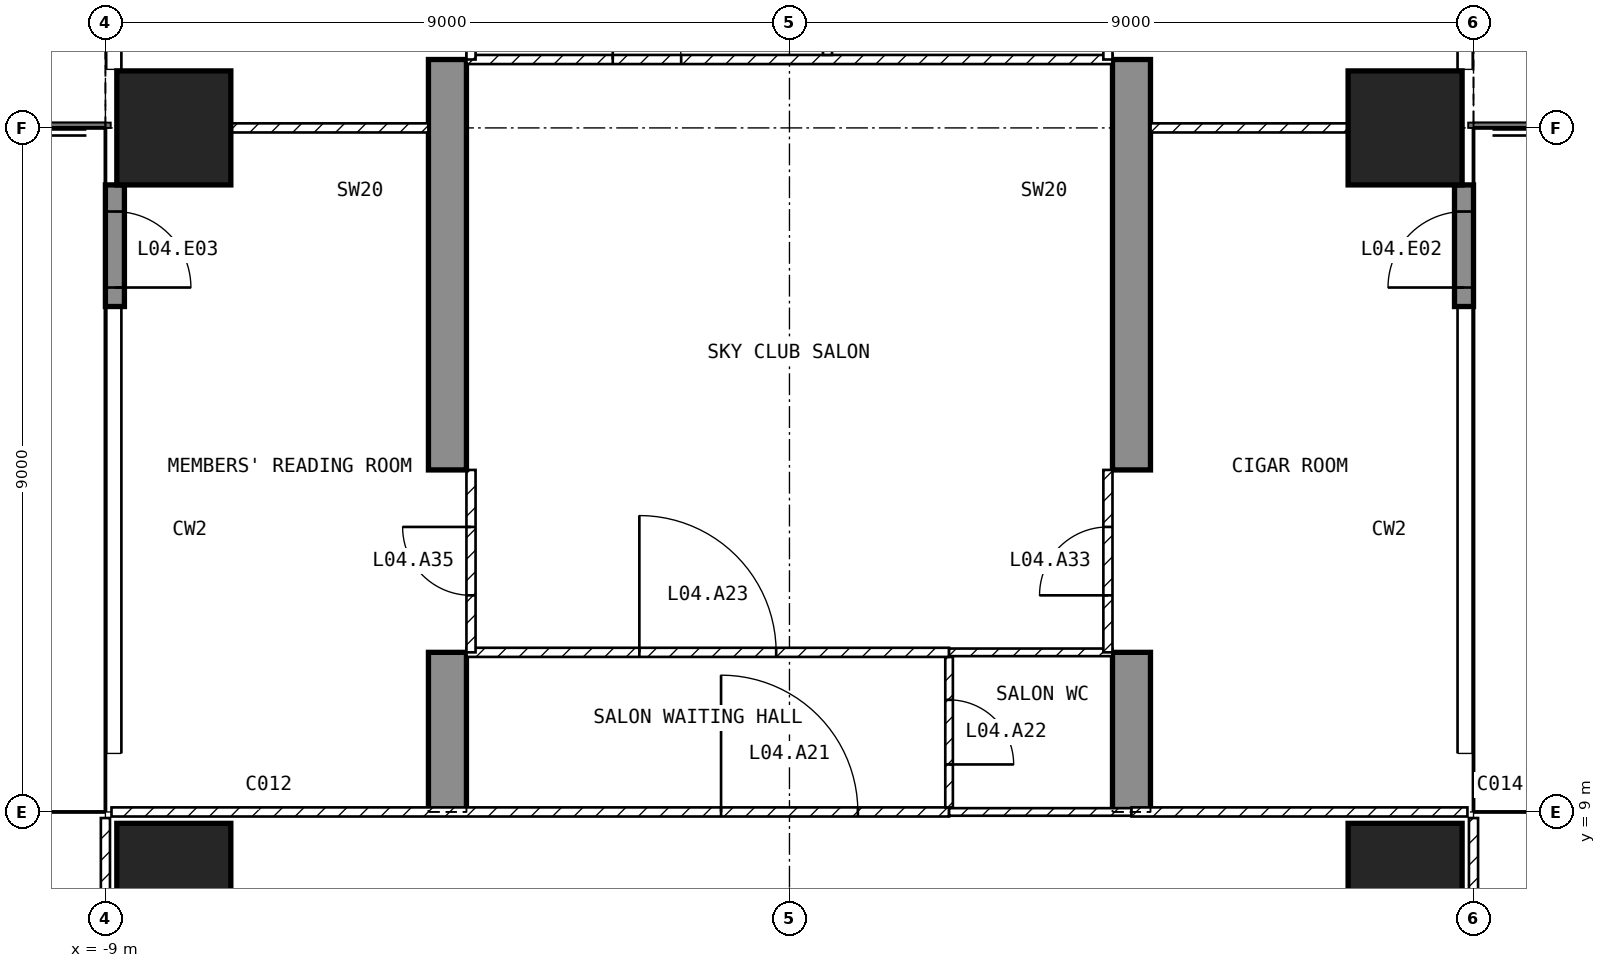
"""IFC4 building model, lengths in metres.
Left out: names, types, materials, properties, quantities, classifications, styles, units other than length and angle.
Written with IfcOpenShell. Run it as: python <this file> out.ifc"""

import sys

from ifc_helpers import new_model, si_unit, direction, frame, frame_2d, origin, origin_2d, place, context, subcontext, project, spatial, polyline, rectangle, outline, extrude, element, fill, save


model = new_model("IFC4")
c1 = context("Model", 3, precision=1e-05, world=origin(), true_north=direction((0.0, 1.0)))
c2 = subcontext(c1, "Body", "Model", "MODEL_VIEW")
j1 = project(units=[si_unit("LENGTHUNIT", "METRE"), si_unit("PLANEANGLEUNIT", "RADIAN")], contexts=[c1])
p1 = place(None, origin())
s1 = spatial("IfcSite", under=j1, at=p1, CompositionType="ELEMENT")
p2 = place(p1, origin())
s2 = spatial("IfcBuilding", under=s1, at=p2, CompositionType="ELEMENT")
p3 = place(p2, frame((0.0, 0.0, 32.0)))
s3 = spatial("IfcBuildingStorey", under=s2, at=p3, CompositionType="ELEMENT", Elevation=32.0)
for number, where, z_axis, x_axis in (
    (1, (-8.1, 8.1, -0.3), (0.0, 0.0, 1.0), (1.0, 0.0, 0.0)),
    (2, (-8.1, 18.0, -0.3), (0.0, 0.0, 1.0), (1.0, 0.0, 0.0)),
    (3, (8.1, 8.1, -0.3), (0.0, 0.0, 1.0), (1.0, 0.0, 0.0)),
    (4, (8.1, 18.0, -0.3), (0.0, 0.0, 1.0), (1.0, 0.0, 0.0)),
):
    element("IfcColumn", number, at=place(p3, frame(where, z_axis=z_axis, x_axis=x_axis)), inside=s3, PredefinedType="COLUMN", context=c2, shape_type="SweptSolid", body=[
        extrude(rectangle(XDim=1.5, YDim=1.5, at=origin_2d()), origin(), (0.0, 0.0, 1.0), 4.55),
    ])
for number, where, z_axis, x_axis in (
    (5, (-4.75, 9.0, -0.3), (1.0, 0.0, 0.0), (0.0, 1.0, 0.0)),
    (6, (4.25, 9.0, -0.3), (1.0, 0.0, 0.0), (0.0, 1.0, 0.0)),
):
    element("IfcWall", number, at=place(p3, frame(where, z_axis=z_axis, x_axis=x_axis)), inside=s3, PredefinedType="SHEAR", context=c2, shape_type="SweptSolid", body=[
        extrude(outline(polyline([(0.0, 0.0), (2.1, 0.0), (2.1, 2.7), (4.5, 2.7), (4.5, 0.0), (9.9, 0.0), (9.9, 2.7), (12.3, 2.7), (12.3, 0.0), (16.35, 0.0), (16.35, 4.55), (0.0, 4.55), (0.0, 0.0)])), origin(), (0.0, 0.0, 1.0), 0.5),
    ])
p4 = place(p3, frame((8.875, 15.65, 0.0), z_axis=(0.0, 0.0, 1.0), x_axis=(0.0, 1.0, 0.0)))
e7 = element("IfcWall", 7, at=p4, inside=s3, PredefinedType="SOLIDWALL", context=c2, shape_type="SweptSolid", body=[
    extrude(rectangle(XDim=1.6, YDim=0.25, at=frame_2d((0.8, 0.0))), origin(), (0.0, 0.0, 1.0), 4.25),
])
p5 = place(p4, frame((0.25, 0.0, 0.0)))
e8 = element("IfcOpeningElement", 8, at=p5, cuts=e7, PredefinedType="OPENING", context=c2, shape_type="SweptSolid", body=[
    extrude(rectangle(XDim=1.0, YDim=2.4, at=frame_2d((0.5, 1.2))), frame((0.0, 0.135, 0.0), z_axis=(0.0, -1.0, 0.0), x_axis=(1.0, 0.0, 0.0)), (0.0, 0.0, 1.0), 0.27),
])
p6 = place(p3, frame((-8.875, 17.25, 0.0), z_axis=(0.0, 0.0, 1.0), x_axis=(0.0, -1.0, 0.0)))
e9 = element("IfcWall", 9, at=p6, inside=s3, PredefinedType="SOLIDWALL", context=c2, shape_type="SweptSolid", body=[
    extrude(rectangle(XDim=1.6, YDim=0.25, at=frame_2d((0.8, 0.0))), origin(), (0.0, 0.0, 1.0), 4.25),
])
p7 = place(p6, frame((0.35, 0.0, 0.0)))
e10 = element("IfcOpeningElement", 10, at=p7, cuts=e9, PredefinedType="OPENING", context=c2, shape_type="SweptSolid", body=[
    extrude(rectangle(XDim=1.0, YDim=2.4, at=frame_2d((0.5, 1.2))), frame((0.0, 0.135, 0.0), z_axis=(0.0, -1.0, 0.0), x_axis=(1.0, 0.0, 0.0)), (0.0, 0.0, 1.0), 0.27),
])
p8 = place(p3, frame((9.0, 8.92, 0.0), z_axis=(0.0, 0.0, 1.0), x_axis=(0.0, -1.0, 0.0)))
e11 = element("IfcWall", 11, at=p8, inside=s3, PredefinedType="PARTITIONING", context=c2, shape_type="SweptSolid", body=[
    extrude(rectangle(XDim=7.66, YDim=0.12, at=frame_2d((3.83, 0.0))), origin(), (0.0, 0.0, 1.0), 4.25),
])
p9 = place(p8, frame((2.77, 0.0, 0.0)))
e12 = element("IfcOpeningElement", 12, at=p9, cuts=e11, PredefinedType="OPENING", context=c2, shape_type="SweptSolid", body=[
    extrude(rectangle(XDim=0.9, YDim=2.1, at=frame_2d((0.45, 1.05))), frame((0.0, 0.07, 0.0), z_axis=(0.0, -1.0, 0.0), x_axis=(1.0, 0.0, 0.0)), (0.0, 0.0, 1.0), 0.14),
])
p10 = place(p8, frame((5.89, 0.0, 0.0)))
e13 = element("IfcOpeningElement", 13, at=p10, cuts=e11, PredefinedType="OPENING", context=c2, shape_type="SweptSolid", body=[
    extrude(rectangle(XDim=0.9, YDim=2.1, at=frame_2d((0.45, 1.05))), frame((0.0, 0.07, 0.0), z_axis=(0.0, -1.0, 0.0), x_axis=(1.0, 0.0, 0.0)), (0.0, 0.0, 1.0), 0.14),
])
p11 = place(p3, frame((-9.0, 1.26, 0.0), z_axis=(0.0, 0.0, 1.0), x_axis=(0.0, 1.0, 0.0)))
e14 = element("IfcWall", 14, at=p11, inside=s3, PredefinedType="PARTITIONING", context=c2, shape_type="SweptSolid", body=[
    extrude(rectangle(XDim=7.66, YDim=0.12, at=frame_2d((3.83, 0.0))), origin(), (0.0, 0.0, 1.0), 4.25),
])
p12 = place(p11, frame((0.72, 0.0, 0.0)))
e15 = element("IfcOpeningElement", 15, at=p12, cuts=e14, PredefinedType="OPENING", context=c2, shape_type="SweptSolid", body=[
    extrude(rectangle(XDim=0.9, YDim=2.1, at=frame_2d((0.45, 1.05))), frame((0.0, 0.07, 0.0), z_axis=(0.0, -1.0, 0.0), x_axis=(1.0, 0.0, 0.0)), (0.0, 0.0, 1.0), 0.14),
])
p13 = place(p3, frame((-8.92, 9.0, 0.0), z_axis=(0.0, 0.0, 1.0), x_axis=(1.0, 0.0, 0.0)))
e16 = element("IfcWall", 16, at=p13, inside=s3, PredefinedType="PARTITIONING", context=c2, shape_type="SweptSolid", body=[
    extrude(rectangle(XDim=11.02, YDim=0.12, at=frame_2d((5.51, 0.0))), origin(), (0.0, 0.0, 1.0), 4.25),
])
p14 = place(p13, frame((8.02, 0.0, 0.0)))
e17 = element("IfcOpeningElement", 17, at=p14, cuts=e16, PredefinedType="OPENING", context=c2, shape_type="SweptSolid", body=[
    extrude(rectangle(XDim=1.8, YDim=2.1, at=frame_2d((0.9, 1.05))), frame((0.0, 0.07, 0.0), z_axis=(0.0, -1.0, 0.0), x_axis=(1.0, 0.0, 0.0)), (0.0, 0.0, 1.0), 0.14),
])
p15 = place(p3, frame((2.1, 9.0, 0.0), z_axis=(0.0, 0.0, 1.0), x_axis=(1.0, 0.0, 0.0)))
e18 = element("IfcWall", 18, at=p15, inside=s3, PredefinedType="PARTITIONING", context=c2, shape_type="SweptSolid", body=[
    extrude(rectangle(XDim=2.4, YDim=0.1, at=frame_2d((1.2, 0.0))), origin(), (0.0, 0.0, 1.0), 4.25),
])
p16 = place(p3, frame((4.5, 9.0, 0.0), z_axis=(0.0, 0.0, 1.0), x_axis=(1.0, 0.0, 0.0)))
e19 = element("IfcWall", 19, at=p16, inside=s3, PredefinedType="PARTITIONING", context=c2, shape_type="SweptSolid", body=[
    extrude(rectangle(XDim=4.42, YDim=0.12, at=frame_2d((2.21, 0.0))), origin(), (0.0, 0.0, 1.0), 4.25),
])
p17 = place(p3, frame((2.1, 11.04, 0.0), z_axis=(0.0, 0.0, 1.0), x_axis=(0.0, -1.0, 0.0)))
e20 = element("IfcWall", 20, at=p17, inside=s3, PredefinedType="PARTITIONING", context=c2, shape_type="SweptSolid", body=[
    extrude(rectangle(XDim=1.98, YDim=0.1, at=frame_2d((0.99, 0.0))), origin(), (0.0, 0.0, 1.0), 4.25),
])
p18 = place(p17, frame((0.565, 0.0, 0.0)))
e21 = element("IfcOpeningElement", 21, at=p18, cuts=e20, PredefinedType="OPENING", context=c2, shape_type="SweptSolid", body=[
    extrude(rectangle(XDim=0.85, YDim=2.1, at=frame_2d((0.425, 1.05))), frame((0.0, 0.06, 0.0), z_axis=(0.0, -1.0, 0.0), x_axis=(1.0, 0.0, 0.0)), (0.0, 0.0, 1.0), 0.12),
])
p19 = place(p3, frame((-4.25, 11.1, 0.0), z_axis=(0.0, 0.0, 1.0), x_axis=(1.0, 0.0, 0.0)))
e22 = element("IfcWall", 22, at=p19, inside=s3, PredefinedType="PARTITIONING", context=c2, shape_type="SweptSolid", body=[
    extrude(rectangle(XDim=6.35, YDim=0.12, at=frame_2d((3.175, 0.0))), origin(), (0.0, 0.0, 1.0), 4.25),
])
p20 = place(p19, frame((2.275, 0.0, 0.0)))
e23 = element("IfcOpeningElement", 23, at=p20, cuts=e22, PredefinedType="OPENING", context=c2, shape_type="SweptSolid", body=[
    extrude(rectangle(XDim=1.8, YDim=2.1, at=frame_2d((0.9, 1.05))), frame((0.0, 0.07, 0.0), z_axis=(0.0, -1.0, 0.0), x_axis=(1.0, 0.0, 0.0)), (0.0, 0.0, 1.0), 0.14),
])
p21 = place(p3, frame((2.1, 11.1, 0.0), z_axis=(0.0, 0.0, 1.0), x_axis=(1.0, 0.0, 0.0)))
e24 = element("IfcWall", 24, at=p21, inside=s3, PredefinedType="PARTITIONING", context=c2, shape_type="SweptSolid", body=[
    extrude(rectangle(XDim=2.15, YDim=0.1, at=frame_2d((1.075, 0.0))), origin(), (0.0, 0.0, 1.0), 4.25),
])
p22 = place(p3, frame((-4.25, 18.9, 0.0), z_axis=(0.0, 0.0, 1.0), x_axis=(1.0, 0.0, 0.0)))
e25 = element("IfcWall", 25, at=p22, inside=s3, PredefinedType="PARTITIONING", context=c2, shape_type="SweptSolid", body=[
    extrude(rectangle(XDim=8.5, YDim=0.12, at=frame_2d((4.25, 0.0))), origin(), (0.0, 0.0, 1.0), 4.25),
])
p23 = place(p22, frame((1.925, 0.0, 0.0)))
e26 = element("IfcOpeningElement", 26, at=p23, cuts=e25, PredefinedType="OPENING", context=c2, shape_type="SweptSolid", body=[
    extrude(rectangle(XDim=0.9, YDim=2.1, at=frame_2d((0.45, 1.05))), frame((0.0, 0.07, 0.0), z_axis=(0.0, -1.0, 0.0), x_axis=(1.0, 0.0, 0.0)), (0.0, 0.0, 1.0), 0.14),
])
p24 = place(p3, frame((0.5, 23.34, 0.0), z_axis=(0.0, 0.0, 1.0), x_axis=(0.0, -1.0, 0.0)))
e27 = element("IfcWall", 27, at=p24, inside=s3, PredefinedType="PARTITIONING", context=c2, shape_type="SweptSolid", body=[
    extrude(rectangle(XDim=4.38, YDim=0.12, at=frame_2d((2.19, 0.0))), origin(), (0.0, 0.0, 1.0), 4.25),
])
p25 = place(p24, frame((1.74, 0.0, 0.0)))
e28 = element("IfcOpeningElement", 28, at=p25, cuts=e27, PredefinedType="OPENING", context=c2, shape_type="SweptSolid", body=[
    extrude(rectangle(XDim=0.9, YDim=2.1, at=frame_2d((0.45, 1.05))), frame((0.0, 0.07, 0.0), z_axis=(0.0, -1.0, 0.0), x_axis=(1.0, 0.0, 0.0)), (0.0, 0.0, 1.0), 0.14),
])
for number, where, z_axis, x_axis in (
    (29, (4.75, 18.0, 0.0), (0.0, 0.0, 1.0), (1.0, 0.0, 0.0)),
    (30, (-7.35, 18.0, 0.0), (0.0, 0.0, 1.0), (1.0, 0.0, 0.0)),
):
    element("IfcWall", number, at=place(p3, frame(where, z_axis=z_axis, x_axis=x_axis)), inside=s3, PredefinedType="PARTITIONING", context=c2, shape_type="SweptSolid", body=[
        extrude(rectangle(XDim=2.6, YDim=0.12, at=frame_2d((1.3, 0.0))), origin(), (0.0, 0.0, 1.0), 3.346),
    ])
p26 = place(p3, frame((4.19, 11.1, 0.0), z_axis=(0.0, 0.0, 1.0), x_axis=(0.0, 1.0, 0.0)))
e31 = element("IfcWall", 31, at=p26, inside=s3, PredefinedType="PARTITIONING", context=c2, shape_type="SweptSolid", body=[
    extrude(rectangle(XDim=2.4, YDim=0.12, at=frame_2d((1.2, 0.0))), origin(), (0.0, 0.0, 1.0), 2.4),
])
p27 = place(p26, frame((0.75, 0.0, 0.0)))
e32 = element("IfcOpeningElement", 32, at=p27, cuts=e31, PredefinedType="OPENING", context=c2, shape_type="SweptSolid", body=[
    extrude(rectangle(XDim=0.9, YDim=2.1, at=frame_2d((0.45, 1.05))), frame((0.0, 0.07, 0.0), z_axis=(0.0, -1.0, 0.0), x_axis=(1.0, 0.0, 0.0)), (0.0, 0.0, 1.0), 0.14),
])
p28 = place(p3, frame((4.19, 18.9, 0.0), z_axis=(0.0, 0.0, 1.0), x_axis=(0.0, 1.0, 0.0)))
e33 = element("IfcWall", 33, at=p28, inside=s3, PredefinedType="PARTITIONING", context=c2, shape_type="SweptSolid", body=[
    extrude(rectangle(XDim=2.4, YDim=0.12, at=frame_2d((1.2, 0.0))), origin(), (0.0, 0.0, 1.0), 2.4),
])
p29 = place(p28, frame((0.75, 0.0, 0.0)))
e34 = element("IfcOpeningElement", 34, at=p29, cuts=e33, PredefinedType="OPENING", context=c2, shape_type="SweptSolid", body=[
    extrude(rectangle(XDim=0.9, YDim=2.1, at=frame_2d((0.45, 1.05))), frame((0.0, 0.07, 0.0), z_axis=(0.0, -1.0, 0.0), x_axis=(1.0, 0.0, 0.0)), (0.0, 0.0, 1.0), 0.14),
])
p30 = place(p3, frame((-4.19, 11.1, 0.0), z_axis=(0.0, 0.0, 1.0), x_axis=(0.0, 1.0, 0.0)))
e35 = element("IfcWall", 35, at=p30, inside=s3, PredefinedType="PARTITIONING", context=c2, shape_type="SweptSolid", body=[
    extrude(rectangle(XDim=2.4, YDim=0.12, at=frame_2d((1.2, 0.0))), origin(), (0.0, 0.0, 1.0), 2.4),
])
p31 = place(p30, frame((0.75, 0.0, 0.0)))
e36 = element("IfcOpeningElement", 36, at=p31, cuts=e35, PredefinedType="OPENING", context=c2, shape_type="SweptSolid", body=[
    extrude(rectangle(XDim=0.9, YDim=2.1, at=frame_2d((0.45, 1.05))), frame((0.0, 0.07, 0.0), z_axis=(0.0, -1.0, 0.0), x_axis=(1.0, 0.0, 0.0)), (0.0, 0.0, 1.0), 0.14),
])
p32 = place(p3, frame((-4.19, 18.9, 0.0), z_axis=(0.0, 0.0, 1.0), x_axis=(0.0, 1.0, 0.0)))
e37 = element("IfcWall", 37, at=p32, inside=s3, PredefinedType="PARTITIONING", context=c2, shape_type="SweptSolid", body=[
    extrude(rectangle(XDim=2.4, YDim=0.12, at=frame_2d((1.2, 0.0))), origin(), (0.0, 0.0, 1.0), 2.4),
])
p33 = place(p32, frame((0.75, 0.0, 0.0)))
e38 = element("IfcOpeningElement", 38, at=p33, cuts=e37, PredefinedType="OPENING", context=c2, shape_type="SweptSolid", body=[
    extrude(rectangle(XDim=0.9, YDim=2.1, at=frame_2d((0.45, 1.05))), frame((0.0, 0.07, 0.0), z_axis=(0.0, -1.0, 0.0), x_axis=(1.0, 0.0, 0.0)), (0.0, 0.0, 1.0), 0.14),
])
p34 = place(p5, origin())
e39 = element("IfcDoor", 39, at=p34, inside=s3, OperationType="SINGLE_SWING_LEFT", PredefinedType="DOOR", context=c2, shape_type="SweptSolid", body=[
    extrude(rectangle(XDim=1.0, YDim=2.4, at=frame_2d((0.5, 1.2))), frame((0.0, 0.025, 0.0), z_axis=(0.0, -1.0, 0.0), x_axis=(1.0, 0.0, 0.0)), (0.0, 0.0, 1.0), 0.05),
])
fill(e8, e39)
p35 = place(p7, origin())
e40 = element("IfcDoor", 40, at=p35, inside=s3, OperationType="SINGLE_SWING_RIGHT", PredefinedType="DOOR", context=c2, shape_type="SweptSolid", body=[
    extrude(rectangle(XDim=1.0, YDim=2.4, at=frame_2d((0.5, 1.2))), frame((0.0, 0.025, 0.0), z_axis=(0.0, -1.0, 0.0), x_axis=(1.0, 0.0, 0.0)), (0.0, 0.0, 1.0), 0.05),
])
fill(e10, e40)
p36 = place(p14, origin())
e41 = element("IfcDoor", 41, at=p36, inside=s3, OperationType="SINGLE_SWING_LEFT", PredefinedType="DOOR", context=c2, shape_type="SweptSolid", body=[
    extrude(rectangle(XDim=1.8, YDim=2.1, at=frame_2d((0.9, 1.05))), frame((0.0, 0.025, 0.0), z_axis=(0.0, -1.0, 0.0), x_axis=(1.0, 0.0, 0.0)), (0.0, 0.0, 1.0), 0.05),
])
fill(e17, e41)
p37 = place(p18, origin())
e42 = element("IfcDoor", 42, at=p37, inside=s3, OperationType="SINGLE_SWING_RIGHT", PredefinedType="DOOR", context=c2, shape_type="SweptSolid", body=[
    extrude(rectangle(XDim=0.85, YDim=2.1, at=frame_2d((0.425, 1.05))), frame((0.0, 0.025, 0.0), z_axis=(0.0, -1.0, 0.0), x_axis=(1.0, 0.0, 0.0)), (0.0, 0.0, 1.0), 0.05),
])
fill(e21, e42)
p38 = place(p20, origin())
e43 = element("IfcDoor", 43, at=p38, inside=s3, OperationType="SINGLE_SWING_LEFT", PredefinedType="DOOR", context=c2, shape_type="SweptSolid", body=[
    extrude(rectangle(XDim=1.8, YDim=2.1, at=frame_2d((0.9, 1.05))), frame((0.0, 0.025, 0.0), z_axis=(0.0, -1.0, 0.0), x_axis=(1.0, 0.0, 0.0)), (0.0, 0.0, 1.0), 0.05),
])
fill(e23, e43)
p39 = place(p23, origin())
e44 = element("IfcDoor", 44, at=p39, inside=s3, OperationType="SINGLE_SWING_LEFT", PredefinedType="DOOR", context=c2, shape_type="SweptSolid", body=[
    extrude(rectangle(XDim=0.9, YDim=2.1, at=frame_2d((0.45, 1.05))), frame((0.0, 0.025, 0.0), z_axis=(0.0, -1.0, 0.0), x_axis=(1.0, 0.0, 0.0)), (0.0, 0.0, 1.0), 0.05),
])
fill(e26, e44)
p40 = place(p27, origin())
e45 = element("IfcDoor", 45, at=p40, inside=s3, OperationType="SINGLE_SWING_LEFT", PredefinedType="DOOR", context=c2, shape_type="SweptSolid", body=[
    extrude(rectangle(XDim=0.9, YDim=2.1, at=frame_2d((0.45, 1.05))), frame((0.0, 0.025, 0.0), z_axis=(0.0, -1.0, 0.0), x_axis=(1.0, 0.0, 0.0)), (0.0, 0.0, 1.0), 0.05),
])
fill(e32, e45)
p41 = place(p31, origin())
e46 = element("IfcDoor", 46, at=p41, inside=s3, OperationType="SINGLE_SWING_RIGHT", PredefinedType="DOOR", context=c2, shape_type="SweptSolid", body=[
    extrude(rectangle(XDim=0.9, YDim=2.1, at=frame_2d((0.45, 1.05))), frame((0.0, 0.025, 0.0), z_axis=(0.0, -1.0, 0.0), x_axis=(1.0, 0.0, 0.0)), (0.0, 0.0, 1.0), 0.05),
])
fill(e36, e46)
save(model, sys.argv[1])
